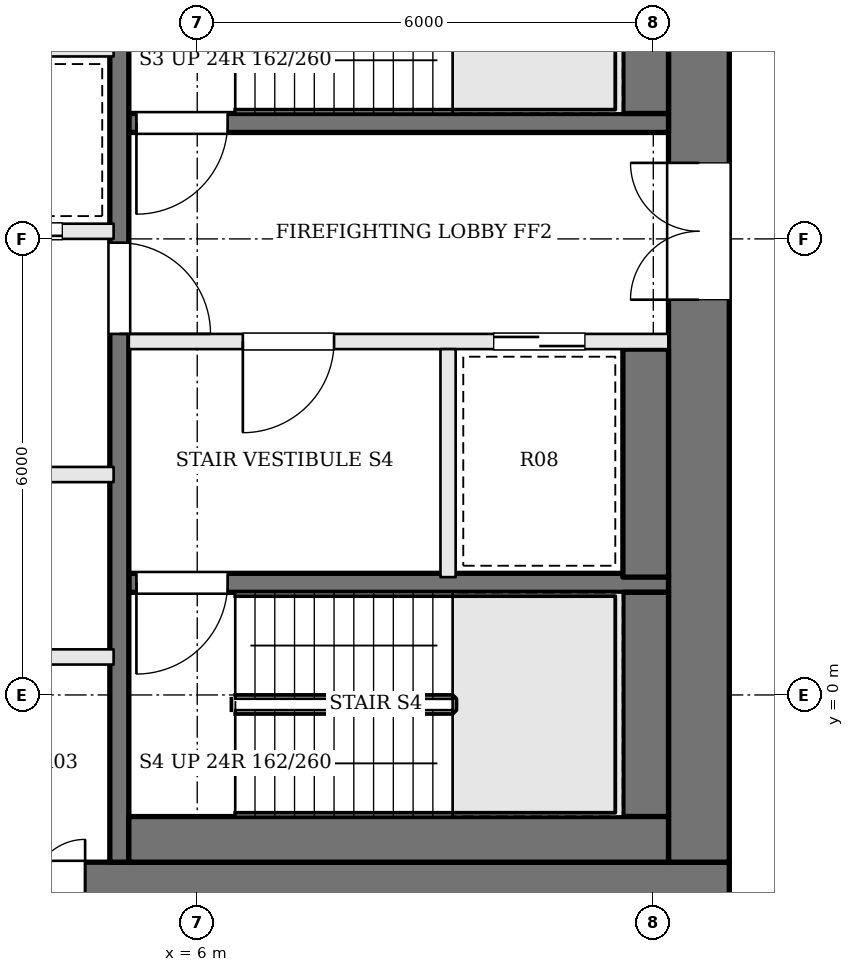
"""IFC4 building model, lengths in metres.
Left out: names, types, materials, properties, quantities, classifications, styles, units other than length and angle.
Written with IfcOpenShell. Run it as: python <this file> out.ifc"""

import sys

from ifc_helpers import new_model, si_unit, direction, frame, frame_2d, origin, place, context, subcontext, project, spatial, rectangle, extrude, element, fill, save


model = new_model("IFC4")
c1 = context("Model", 3, precision=1e-05, world=origin(), true_north=direction((0.0, 1.0)))
c2 = subcontext(c1, "Body", "Model", "MODEL_VIEW")
j1 = project(units=[si_unit("LENGTHUNIT", "METRE"), si_unit("PLANEANGLEUNIT", "RADIAN")], contexts=[c1])
p1 = place(None, origin())
s1 = spatial("IfcSite", under=j1, at=p1, CompositionType="ELEMENT")
p2 = place(p1, origin())
s2 = spatial("IfcBuilding", under=s1, at=p2, CompositionType="ELEMENT")
p3 = place(p2, frame((0.0, 0.0, 248.7)))
s3 = spatial("IfcBuildingStorey", under=s2, at=p3, CompositionType="ELEMENT", Elevation=248.7)
p4 = place(p3, frame((-13.0, -2.6, 0.0), z_axis=(0.0, 0.0, 1.0), x_axis=(1.0, 0.0, 0.0)))
e1 = element("IfcWall", 1, at=p4, inside=s3, PredefinedType="SHEAR", context=c2, shape_type="SweptSolid", body=[
    extrude(rectangle(XDim=26.0, YDim=0.8, at=frame_2d((13.0, 0.0))), origin(), (0.0, 0.0, 1.0), 3.9),
])
p5 = place(p4, frame((9.475, 0.0, 0.0)))
e2 = element("IfcOpeningElement", 2, at=p5, cuts=e1, PredefinedType="OPENING", context=c2, shape_type="SweptSolid", body=[
    extrude(rectangle(XDim=0.9, YDim=2.1, at=frame_2d((0.45, 1.05))), frame((0.0, 0.41, 0.0), z_axis=(0.0, -1.0, 0.0), x_axis=(1.0, 0.0, 0.0)), (0.0, 0.0, 1.0), 0.82),
])
p6 = place(p4, frame((12.75, 0.0, 0.0)))
e3 = element("IfcOpeningElement", 3, at=p6, cuts=e1, PredefinedType="OPENING", context=c2, shape_type="SweptSolid", body=[
    extrude(rectangle(XDim=0.9, YDim=2.1, at=frame_2d((0.45, 1.05))), frame((0.0, 0.41, 0.0), z_axis=(0.0, -1.0, 0.0), x_axis=(1.0, 0.0, 0.0)), (0.0, 0.0, 1.0), 0.82),
])
p7 = place(p4, frame((15.05, 0.0, 0.0)))
e4 = element("IfcOpeningElement", 4, at=p7, cuts=e1, PredefinedType="OPENING", context=c2, shape_type="SweptSolid", body=[
    extrude(rectangle(XDim=1.0, YDim=2.1, at=frame_2d((0.5, 1.05))), frame((0.0, 0.41, 0.0), z_axis=(0.0, -1.0, 0.0), x_axis=(1.0, 0.0, 0.0)), (0.0, 0.0, 1.0), 0.82),
])
p8 = place(p4, frame((16.825, 0.0, 0.0)))
e5 = element("IfcOpeningElement", 5, at=p8, cuts=e1, PredefinedType="OPENING", context=c2, shape_type="SweptSolid", body=[
    extrude(rectangle(XDim=0.7, YDim=2.1, at=frame_2d((0.35, 1.05))), frame((0.0, 0.41, 0.0), z_axis=(0.0, -1.0, 0.0), x_axis=(1.0, 0.0, 0.0)), (0.0, 0.0, 1.0), 0.82),
])
p9 = place(p3, frame((12.6, -2.2, 0.0), z_axis=(0.0, 0.0, 1.0), x_axis=(0.0, 1.0, 0.0)))
e6 = element("IfcWall", 6, at=p9, inside=s3, PredefinedType="SHEAR", context=c2, shape_type="SweptSolid", body=[
    extrude(rectangle(XDim=13.4, YDim=0.8, at=frame_2d((6.7, 0.0))), origin(), (0.0, 0.0, 1.0), 3.9),
])
p10 = place(p9, frame((7.4, 0.0, 0.0)))
e7 = element("IfcOpeningElement", 7, at=p10, cuts=e6, PredefinedType="OPENING", context=c2, shape_type="SweptSolid", body=[
    extrude(rectangle(XDim=1.8, YDim=2.1, at=frame_2d((0.9, 1.05))), frame((0.0, 0.41, 0.0), z_axis=(0.0, -1.0, 0.0), x_axis=(1.0, 0.0, 0.0)), (0.0, 0.0, 1.0), 0.82),
])
p11 = place(p3, frame((12.2, 7.525, 0.0), z_axis=(0.0, 0.0, 1.0), x_axis=(-1.0, 0.0, 0.0)))
e8 = element("IfcWall", 8, at=p11, inside=s3, PredefinedType="SOLIDWALL", context=c2, shape_type="SweptSolid", body=[
    extrude(rectangle(XDim=7.1, YDim=0.25, at=frame_2d((3.55, 0.0))), origin(), (0.0, 0.0, 1.0), 3.7),
])
p12 = place(p11, frame((5.8, 0.0, 0.0)))
e9 = element("IfcOpeningElement", 9, at=p12, cuts=e8, PredefinedType="OPENING", context=c2, shape_type="SweptSolid", body=[
    extrude(rectangle(XDim=1.2, YDim=2.1, at=frame_2d((0.6, 1.05))), frame((0.0, 0.135, 0.0), z_axis=(0.0, -1.0, 0.0), x_axis=(1.0, 0.0, 0.0)), (0.0, 0.0, 1.0), 0.27),
])
p13 = place(p3, frame((12.2, 4.65, 0.0), z_axis=(0.0, 0.0, 1.0), x_axis=(-1.0, 0.0, 0.0)))
e10 = element("IfcWall", 10, at=p13, inside=s3, PredefinedType="SOLIDWALL", context=c2, shape_type="SweptSolid", body=[
    extrude(rectangle(XDim=7.1, YDim=0.2, at=frame_2d((3.55, 0.0))), origin(), (0.0, 0.0, 1.0), 3.7),
])
p14 = place(p13, frame((4.4, 0.0, 0.0)))
e11 = element("IfcOpeningElement", 11, at=p14, cuts=e10, PredefinedType="OPENING", context=c2, shape_type="SweptSolid", body=[
    extrude(rectangle(XDim=1.2, YDim=2.1, at=frame_2d((0.6, 1.05))), frame((0.0, 0.11, 0.0), z_axis=(0.0, -1.0, 0.0), x_axis=(1.0, 0.0, 0.0)), (0.0, 0.0, 1.0), 0.22),
])
p15 = place(p13, frame((1.1, 0.0, 0.0)))
e12 = element("IfcOpeningElement", 12, at=p15, cuts=e10, PredefinedType="OPENING", context=c2, shape_type="SweptSolid", body=[
    extrude(rectangle(XDim=1.2, YDim=2.1, at=frame_2d((0.6, 1.05))), frame((0.0, 0.11, 0.0), z_axis=(0.0, -1.0, 0.0), x_axis=(1.0, 0.0, 0.0)), (0.0, 0.0, 1.0), 0.22),
])
p16 = place(p3, frame((12.2, 1.475, 0.0), z_axis=(0.0, 0.0, 1.0), x_axis=(-1.0, 0.0, 0.0)))
e13 = element("IfcWall", 13, at=p16, inside=s3, PredefinedType="SOLIDWALL", context=c2, shape_type="SweptSolid", body=[
    extrude(rectangle(XDim=7.1, YDim=0.25, at=frame_2d((3.55, 0.0))), origin(), (0.0, 0.0, 1.0), 3.7),
])
p17 = place(p16, frame((5.8, 0.0, 0.0)))
e14 = element("IfcOpeningElement", 14, at=p17, cuts=e13, PredefinedType="OPENING", context=c2, shape_type="SweptSolid", body=[
    extrude(rectangle(XDim=1.2, YDim=2.1, at=frame_2d((0.6, 1.05))), frame((0.0, 0.135, 0.0), z_axis=(0.0, -1.0, 0.0), x_axis=(1.0, 0.0, 0.0)), (0.0, 0.0, 1.0), 0.27),
])
p18 = place(p3, frame((9.3, 4.55, 0.0), z_axis=(0.0, 0.0, 1.0), x_axis=(0.0, -1.0, 0.0)))
e15 = element("IfcWall", 15, at=p18, inside=s3, PredefinedType="SOLIDWALL", context=c2, shape_type="SweptSolid", body=[
    extrude(rectangle(XDim=3.0, YDim=0.2, at=frame_2d((1.5, 0.0))), origin(), (0.0, 0.0, 1.0), 3.7),
])
p19 = place(p3, frame((4.975, 11.2, 0.0), z_axis=(0.0, 0.0, 1.0), x_axis=(0.0, -1.0, 0.0)))
e16 = element("IfcWall", 16, at=p19, inside=s3, PredefinedType="SOLIDWALL", context=c2, shape_type="SweptSolid", body=[
    extrude(rectangle(XDim=13.4, YDim=0.25, at=frame_2d((6.7, 0.0))), origin(), (0.0, 0.0, 1.0), 3.7),
])
p20 = place(p19, frame((5.25, 0.0, 0.0)))
e17 = element("IfcOpeningElement", 17, at=p20, cuts=e16, PredefinedType="OPENING", context=c2, shape_type="SweptSolid", body=[
    extrude(rectangle(XDim=1.2, YDim=2.1, at=frame_2d((0.6, 1.05))), frame((0.0, 0.135, 0.0), z_axis=(0.0, -1.0, 0.0), x_axis=(1.0, 0.0, 0.0)), (0.0, 0.0, 1.0), 0.27),
])
p21 = place(p3, frame((11.9, 10.6, 0.0), z_axis=(0.0, 0.0, 1.0), x_axis=(0.0, -1.0, 0.0)))
e18 = element("IfcWall", 18, at=p21, inside=s3, PredefinedType="SOLIDWALL", context=c2, shape_type="SweptSolid", body=[
    extrude(rectangle(XDim=2.95, YDim=0.6, at=frame_2d((1.475, 0.0))), origin(), (0.0, 0.0, 1.0), 3.7),
])
p22 = place(p3, frame((11.9, 4.55, 0.0), z_axis=(0.0, 0.0, 1.0), x_axis=(0.0, -1.0, 0.0)))
e19 = element("IfcWall", 19, at=p22, inside=s3, PredefinedType="SOLIDWALL", context=c2, shape_type="SweptSolid", body=[
    extrude(rectangle(XDim=3.0, YDim=0.6, at=frame_2d((1.5, 0.0))), origin(), (0.0, 0.0, 1.0), 3.7),
])
p23 = place(p3, frame((11.9, 1.35, 0.0), z_axis=(0.0, 0.0, 1.0), x_axis=(0.0, -1.0, 0.0)))
e20 = element("IfcWall", 20, at=p23, inside=s3, PredefinedType="SOLIDWALL", context=c2, shape_type="SweptSolid", body=[
    extrude(rectangle(XDim=2.95, YDim=0.6, at=frame_2d((1.475, 0.0))), origin(), (0.0, 0.0, 1.0), 3.7),
])
p24 = place(p3, frame((12.2, -1.9, 0.0), z_axis=(0.0, 0.0, 1.0), x_axis=(-1.0, 0.0, 0.0)))
e21 = element("IfcWall", 21, at=p24, inside=s3, PredefinedType="SOLIDWALL", context=c2, shape_type="SweptSolid", body=[
    extrude(rectangle(XDim=7.1, YDim=0.6, at=frame_2d((3.55, 0.0))), origin(), (0.0, 0.0, 1.0), 3.7),
])
p25 = place(p3, frame((-4.9, 0.5, 0.0), z_axis=(0.0, 0.0, 1.0), x_axis=(1.0, 0.0, 0.0)))
e22 = element("IfcWall", 22, at=p25, inside=s3, PredefinedType="SOLIDWALL", context=c2, shape_type="SweptSolid", body=[
    extrude(rectangle(XDim=9.8, YDim=0.2, at=frame_2d((4.9, 0.0))), origin(), (0.0, 0.0, 1.0), 3.7),
])
p26 = place(p3, frame((-4.9, 2.9, 0.0), z_axis=(0.0, 0.0, 1.0), x_axis=(1.0, 0.0, 0.0)))
e23 = element("IfcWall", 23, at=p26, inside=s3, PredefinedType="SOLIDWALL", context=c2, shape_type="SweptSolid", body=[
    extrude(rectangle(XDim=9.8, YDim=0.2, at=frame_2d((4.9, 0.0))), origin(), (0.0, 0.0, 1.0), 3.7),
])
p27 = place(p26, frame((0.675, 0.0, 0.0)))
e24 = element("IfcOpeningElement", 24, at=p27, cuts=e23, PredefinedType="OPENING", context=c2, shape_type="SweptSolid", body=[
    extrude(rectangle(XDim=1.1, YDim=2.1, at=frame_2d((0.55, 1.05))), frame((0.0, 0.11, 0.0), z_axis=(0.0, -1.0, 0.0), x_axis=(1.0, 0.0, 0.0)), (0.0, 0.0, 1.0), 0.22),
])
p28 = place(p26, frame((2.613, 0.0, 0.0)))
e25 = element("IfcOpeningElement", 25, at=p28, cuts=e23, PredefinedType="OPENING", context=c2, shape_type="SweptSolid", body=[
    extrude(rectangle(XDim=0.9, YDim=2.1, at=frame_2d((0.45, 1.05))), frame((0.0, 0.11, 0.0), z_axis=(0.0, -1.0, 0.0), x_axis=(1.0, 0.0, 0.0)), (0.0, 0.0, 1.0), 0.22),
])
p29 = place(p26, frame((4.35, 0.0, 0.0)))
e26 = element("IfcOpeningElement", 26, at=p29, cuts=e23, PredefinedType="OPENING", context=c2, shape_type="SweptSolid", body=[
    extrude(rectangle(XDim=1.1, YDim=2.1, at=frame_2d((0.55, 1.05))), frame((0.0, 0.11, 0.0), z_axis=(0.0, -1.0, 0.0), x_axis=(1.0, 0.0, 0.0)), (0.0, 0.0, 1.0), 0.22),
])
p30 = place(p26, frame((7.463, 0.0, 0.0)))
e27 = element("IfcOpeningElement", 27, at=p30, cuts=e23, PredefinedType="OPENING", context=c2, shape_type="SweptSolid", body=[
    extrude(rectangle(XDim=1.0, YDim=2.1, at=frame_2d((0.5, 1.05))), frame((0.0, 0.11, 0.0), z_axis=(0.0, -1.0, 0.0), x_axis=(1.0, 0.0, 0.0)), (0.0, 0.0, 1.0), 0.22),
])
p31 = place(p3, frame((-4.9, 6.1, 0.0), z_axis=(0.0, 0.0, 1.0), x_axis=(1.0, 0.0, 0.0)))
e28 = element("IfcWall", 28, at=p31, inside=s3, PredefinedType="SOLIDWALL", context=c2, shape_type="SweptSolid", body=[
    extrude(rectangle(XDim=9.8, YDim=0.2, at=frame_2d((4.9, 0.0))), origin(), (0.0, 0.0, 1.0), 3.7),
])
p32 = place(p31, frame((0.675, 0.0, 0.0)))
e29 = element("IfcOpeningElement", 29, at=p32, cuts=e28, PredefinedType="OPENING", context=c2, shape_type="SweptSolid", body=[
    extrude(rectangle(XDim=1.1, YDim=2.1, at=frame_2d((0.55, 1.05))), frame((0.0, 0.11, 0.0), z_axis=(0.0, -1.0, 0.0), x_axis=(1.0, 0.0, 0.0)), (0.0, 0.0, 1.0), 0.22),
])
p33 = place(p31, frame((3.125, 0.0, 0.0)))
e30 = element("IfcOpeningElement", 30, at=p33, cuts=e28, PredefinedType="OPENING", context=c2, shape_type="SweptSolid", body=[
    extrude(rectangle(XDim=1.1, YDim=2.1, at=frame_2d((0.55, 1.05))), frame((0.0, 0.11, 0.0), z_axis=(0.0, -1.0, 0.0), x_axis=(1.0, 0.0, 0.0)), (0.0, 0.0, 1.0), 0.22),
])
p34 = place(p31, frame((5.575, 0.0, 0.0)))
e31 = element("IfcOpeningElement", 31, at=p34, cuts=e28, PredefinedType="OPENING", context=c2, shape_type="SweptSolid", body=[
    extrude(rectangle(XDim=1.1, YDim=2.1, at=frame_2d((0.55, 1.05))), frame((0.0, 0.11, 0.0), z_axis=(0.0, -1.0, 0.0), x_axis=(1.0, 0.0, 0.0)), (0.0, 0.0, 1.0), 0.22),
])
p35 = place(p31, frame((8.025, 0.0, 0.0)))
e32 = element("IfcOpeningElement", 32, at=p35, cuts=e28, PredefinedType="OPENING", context=c2, shape_type="SweptSolid", body=[
    extrude(rectangle(XDim=1.1, YDim=2.1, at=frame_2d((0.55, 1.05))), frame((0.0, 0.11, 0.0), z_axis=(0.0, -1.0, 0.0), x_axis=(1.0, 0.0, 0.0)), (0.0, 0.0, 1.0), 0.22),
])
p36 = place(p3, frame((-4.9, 8.5, 0.0), z_axis=(0.0, 0.0, 1.0), x_axis=(1.0, 0.0, 0.0)))
e33 = element("IfcWall", 33, at=p36, inside=s3, PredefinedType="SOLIDWALL", context=c2, shape_type="SweptSolid", body=[
    extrude(rectangle(XDim=9.8, YDim=0.2, at=frame_2d((4.9, 0.0))), origin(), (0.0, 0.0, 1.0), 3.7),
])
p37 = place(p10, origin())
e34 = element("IfcDoor", 34, at=p37, inside=s3, OperationType="DOUBLE_DOOR_SINGLE_SWING", PredefinedType="DOOR", context=c2, shape_type="SweptSolid", body=[
    extrude(rectangle(XDim=1.8, YDim=2.1, at=frame_2d((0.9, 1.05))), frame((0.0, 0.025, 0.0), z_axis=(0.0, -1.0, 0.0), x_axis=(1.0, 0.0, 0.0)), (0.0, 0.0, 1.0), 0.05),
])
fill(e7, e34)
p38 = place(p20, origin())
e35 = element("IfcDoor", 35, at=p38, inside=s3, OperationType="SINGLE_SWING_RIGHT", PredefinedType="DOOR", context=c2, shape_type="SweptSolid", body=[
    extrude(rectangle(XDim=1.2, YDim=2.1, at=frame_2d((0.6, 1.05))), frame((0.0, 0.025, 0.0), z_axis=(0.0, -1.0, 0.0), x_axis=(1.0, 0.0, 0.0)), (0.0, 0.0, 1.0), 0.05),
])
fill(e17, e35)
p39 = place(p14, origin())
e36 = element("IfcDoor", 36, at=p39, inside=s3, OperationType="SINGLE_SWING_RIGHT", PredefinedType="DOOR", context=c2, shape_type="SweptSolid", body=[
    extrude(rectangle(XDim=1.2, YDim=2.1, at=frame_2d((0.6, 1.05))), frame((0.0, 0.025, 0.0), z_axis=(0.0, -1.0, 0.0), x_axis=(1.0, 0.0, 0.0)), (0.0, 0.0, 1.0), 0.05),
])
fill(e11, e36)
p40 = place(p12, origin())
e37 = element("IfcDoor", 37, at=p40, inside=s3, OperationType="SINGLE_SWING_RIGHT", PredefinedType="DOOR", context=c2, shape_type="SweptSolid", body=[
    extrude(rectangle(XDim=1.2, YDim=2.1, at=frame_2d((0.6, 1.05))), frame((0.0, 0.025, 0.0), z_axis=(0.0, -1.0, 0.0), x_axis=(1.0, 0.0, 0.0)), (0.0, 0.0, 1.0), 0.05),
])
fill(e9, e37)
p41 = place(p17, origin())
e38 = element("IfcDoor", 38, at=p41, inside=s3, OperationType="SINGLE_SWING_RIGHT", PredefinedType="DOOR", context=c2, shape_type="SweptSolid", body=[
    extrude(rectangle(XDim=1.2, YDim=2.1, at=frame_2d((0.6, 1.05))), frame((0.0, 0.025, 0.0), z_axis=(0.0, -1.0, 0.0), x_axis=(1.0, 0.0, 0.0)), (0.0, 0.0, 1.0), 0.05),
])
fill(e14, e38)
p42 = place(p15, origin())
e39 = element("IfcDoor", 39, at=p42, inside=s3, OperationType="SLIDING_TO_RIGHT", PredefinedType="DOOR", context=c2, shape_type="SweptSolid", body=[
    extrude(rectangle(XDim=1.2, YDim=2.1, at=frame_2d((0.6, 1.05))), frame((0.0, 0.025, 0.0), z_axis=(0.0, -1.0, 0.0), x_axis=(1.0, 0.0, 0.0)), (0.0, 0.0, 1.0), 0.05),
])
fill(e12, e39)
p43 = place(p35, origin())
e40 = element("IfcDoor", 40, at=p43, inside=s3, OperationType="SLIDING_TO_LEFT", PredefinedType="DOOR", context=c2, shape_type="SweptSolid", body=[
    extrude(rectangle(XDim=1.1, YDim=2.1, at=frame_2d((0.55, 1.05))), frame((0.0, 0.025, 0.0), z_axis=(0.0, -1.0, 0.0), x_axis=(1.0, 0.0, 0.0)), (0.0, 0.0, 1.0), 0.05),
])
fill(e32, e40)
p44 = place(p8, origin())
e41 = element("IfcDoor", 41, at=p44, inside=s3, OperationType="SINGLE_SWING_RIGHT", PredefinedType="DOOR", context=c2, shape_type="SweptSolid", body=[
    extrude(rectangle(XDim=0.7, YDim=2.1, at=frame_2d((0.35, 1.05))), frame((0.0, 0.025, 0.0), z_axis=(0.0, -1.0, 0.0), x_axis=(1.0, 0.0, 0.0)), (0.0, 0.0, 1.0), 0.05),
])
fill(e5, e41)
save(model, sys.argv[1])
